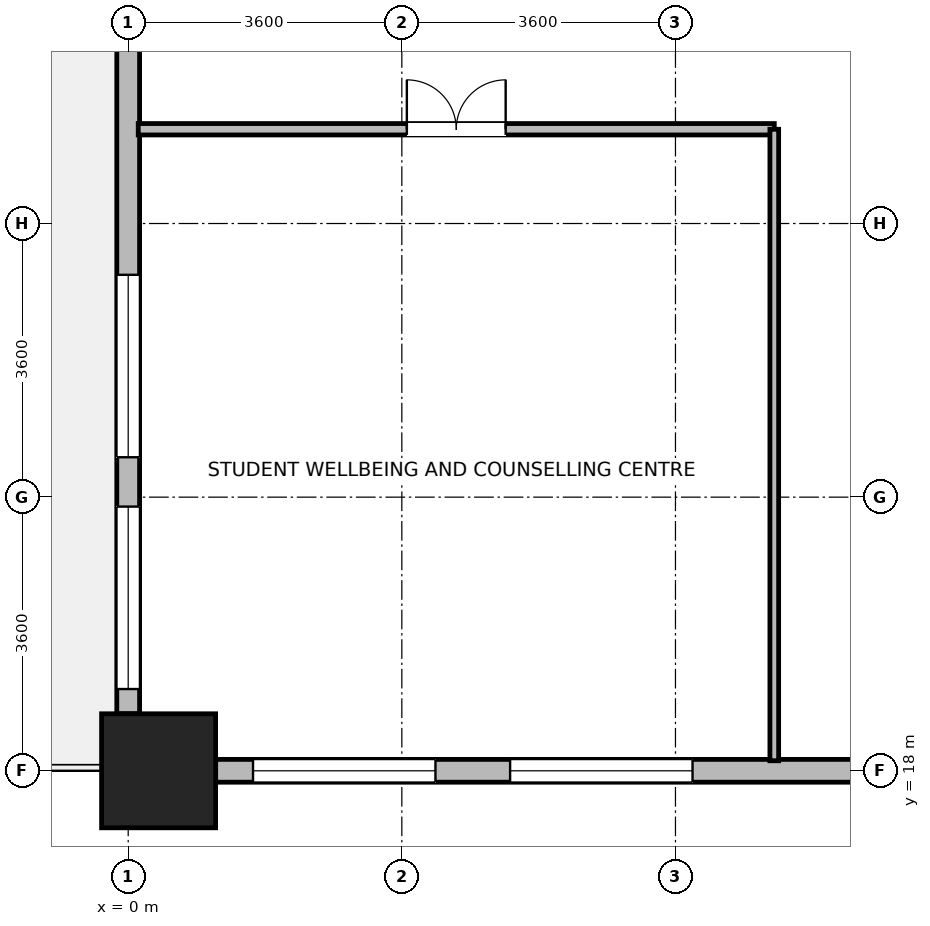
"""IFC4 building model, lengths in metres.
Left out: names, types, materials, properties, quantities, classifications, styles, units other than length and angle.
Written with IfcOpenShell. Run it as: python <this file> out.ifc"""

import sys

from ifc_helpers import new_model, si_unit, direction, frame, frame_2d, origin, origin_2d, place, context, subcontext, project, spatial, rectangle, extrude, source, transform, mapped, element, fill, save


model = new_model("IFC4")
c1 = context("Model", 3, precision=1e-05, world=origin(), true_north=direction((0.0, 1.0)))
c2 = subcontext(c1, "Body", "Model", "MODEL_VIEW")
j1 = project(units=[si_unit("LENGTHUNIT", "METRE"), si_unit("PLANEANGLEUNIT", "RADIAN")], contexts=[c1])
p1 = place(None, origin())
s1 = spatial("IfcSite", under=j1, at=p1, CompositionType="ELEMENT")
p2 = place(p1, origin())
s2 = spatial("IfcBuilding", under=s1, at=p2, CompositionType="ELEMENT")
p3 = place(p2, frame((0.0, 0.0, 15.0)))
s3 = spatial("IfcBuildingStorey", under=s2, at=p3, CompositionType="ELEMENT", Elevation=15.0)
m1 = source(origin(), c2, "Body", "SweptSolid", [
    extrude(rectangle(XDim=1.5, YDim=1.5, at=origin_2d()), origin(), (0.0, 0.0, 1.0), 4.8),
])
p4 = place(p3, frame((0.4, 18.0, 0.0), z_axis=(0.0, 0.0, 1.0), x_axis=(1.0, 0.0, 0.0)))
e1 = element("IfcColumn", 1, at=p4, inside=s3, PredefinedType="COLUMN", context=c2, shape_type="MappedRepresentation", body=[
    mapped(m1, transform((0.0, 0.0, 0.0), x_axis=(1.0, 0.0, 0.0), y_axis=(0.0, 1.0, 0.0), z_axis=(0.0, 0.0, 1.0), scale=1.0)),
])
p5 = place(p3, frame((0.0, 18.751, 0.0), z_axis=(0.0, 0.0, 1.0), x_axis=(0.0, 1.0, 0.0)))
e2 = element("IfcWall", 2, at=p5, inside=s3, PredefinedType="STANDARD", context=c2, shape_type="SweptSolid", body=[
    extrude(rectangle(XDim=9.148, YDim=0.3, at=frame_2d((4.574, 0.0))), origin(), (0.0, 0.0, 1.0), 4.36),
])
p6 = place(p5, frame((0.325, 0.0, 0.9)))
e3 = element("IfcOpeningElement", 3, at=p6, cuts=e2, PredefinedType="OPENING", context=c2, shape_type="SweptSolid", body=[
    extrude(rectangle(XDim=2.4, YDim=2.5, at=frame_2d((1.2, 1.25))), frame((0.0, 0.16, 0.0), z_axis=(0.0, -1.0, 0.0), x_axis=(1.0, 0.0, 0.0)), (0.0, 0.0, 1.0), 0.32),
])
p7 = place(p5, frame((3.374, 0.0, 0.9)))
e4 = element("IfcOpeningElement", 4, at=p7, cuts=e2, PredefinedType="OPENING", context=c2, shape_type="SweptSolid", body=[
    extrude(rectangle(XDim=2.4, YDim=2.5, at=frame_2d((1.2, 1.25))), frame((0.0, 0.16, 0.0), z_axis=(0.0, -1.0, 0.0), x_axis=(1.0, 0.0, 0.0)), (0.0, 0.0, 1.0), 0.32),
])
p8 = place(p3, frame((21.445, 18.0, 0.0), z_axis=(0.0, 0.0, 1.0), x_axis=(-1.0, 0.0, 0.0)))
e5 = element("IfcWall", 5, at=p8, inside=s3, PredefinedType="STANDARD", context=c2, shape_type="SweptSolid", body=[
    extrude(rectangle(XDim=20.294, YDim=0.3, at=frame_2d((10.147, 0.0))), origin(), (0.0, 0.0, 1.0), 4.36),
])
p9 = place(p8, frame((0.491, 0.0, 0.9)))
e6 = element("IfcOpeningElement", 6, at=p9, cuts=e5, PredefinedType="OPENING", context=c2, shape_type="SweptSolid", body=[
    extrude(rectangle(XDim=2.4, YDim=2.5, at=frame_2d((1.2, 1.25))), frame((0.0, 0.16, 0.0), z_axis=(0.0, -1.0, 0.0), x_axis=(1.0, 0.0, 0.0)), (0.0, 0.0, 1.0), 0.32),
])
p10 = place(p8, frame((3.874, 0.0, 0.9)))
e7 = element("IfcOpeningElement", 7, at=p10, cuts=e5, PredefinedType="OPENING", context=c2, shape_type="SweptSolid", body=[
    extrude(rectangle(XDim=2.4, YDim=2.5, at=frame_2d((1.2, 1.25))), frame((0.0, 0.16, 0.0), z_axis=(0.0, -1.0, 0.0), x_axis=(1.0, 0.0, 0.0)), (0.0, 0.0, 1.0), 0.32),
])
p11 = place(p8, frame((7.256, 0.0, 0.9)))
e8 = element("IfcOpeningElement", 8, at=p11, cuts=e5, PredefinedType="OPENING", context=c2, shape_type="SweptSolid", body=[
    extrude(rectangle(XDim=2.4, YDim=2.5, at=frame_2d((1.2, 1.25))), frame((0.0, 0.16, 0.0), z_axis=(0.0, -1.0, 0.0), x_axis=(1.0, 0.0, 0.0)), (0.0, 0.0, 1.0), 0.32),
])
p12 = place(p8, frame((14.021, 0.0, 0.9)))
e9 = element("IfcOpeningElement", 9, at=p12, cuts=e5, PredefinedType="OPENING", context=c2, shape_type="SweptSolid", body=[
    extrude(rectangle(XDim=2.4, YDim=2.5, at=frame_2d((1.2, 1.25))), frame((0.0, 0.16, 0.0), z_axis=(0.0, -1.0, 0.0), x_axis=(1.0, 0.0, 0.0)), (0.0, 0.0, 1.0), 0.32),
])
p13 = place(p8, frame((17.403, 0.0, 0.9)))
e10 = element("IfcOpeningElement", 10, at=p13, cuts=e5, PredefinedType="OPENING", context=c2, shape_type="SweptSolid", body=[
    extrude(rectangle(XDim=2.4, YDim=2.5, at=frame_2d((1.2, 1.25))), frame((0.0, 0.16, 0.0), z_axis=(0.0, -1.0, 0.0), x_axis=(1.0, 0.0, 0.0)), (0.0, 0.0, 1.0), 0.32),
])
p14 = place(p3, frame((0.132, 26.44, 0.0), z_axis=(0.0, 0.0, 1.0), x_axis=(1.0, 0.0, 0.0)))
e11 = element("IfcWall", 11, at=p14, inside=s3, PredefinedType="PARTITIONING", context=c2, shape_type="SweptSolid", body=[
    extrude(rectangle(XDim=8.368, YDim=0.15, at=frame_2d((4.184, 0.0))), origin(), (0.0, 0.0, 1.0), 4.36),
])
p15 = place(p14, frame((3.534, 0.0, 0.0)))
e12 = element("IfcOpeningElement", 12, at=p15, cuts=e11, PredefinedType="OPENING", context=c2, shape_type="SweptSolid", body=[
    extrude(rectangle(XDim=1.3, YDim=2.12, at=frame_2d((0.65, 1.06))), frame((0.0, 0.085, 0.0), z_axis=(0.0, -1.0, 0.0), x_axis=(1.0, 0.0, 0.0)), (0.0, 0.0, 1.0), 0.17),
])
p16 = place(p3, frame((8.5, 18.132, 0.0), z_axis=(0.0, 0.0, 1.0), x_axis=(0.0, 1.0, 0.0)))
e13 = element("IfcWall", 13, at=p16, inside=s3, PredefinedType="PARTITIONING", context=c2, shape_type="SweptSolid", body=[
    extrude(rectangle(XDim=8.308, YDim=0.115, at=frame_2d((4.154, 0.0))), origin(), (0.0, 0.0, 1.0), 4.36),
])
p17 = place(p6, origin())
e14 = element("IfcWindow", 14, at=p17, inside=s3, PartitioningType="SINGLE_PANEL", PredefinedType="WINDOW", context=c2, shape_type="SweptSolid", body=[
    extrude(rectangle(XDim=2.4, YDim=2.5, at=frame_2d((1.2, 1.25))), frame((0.0, 0.03, 0.0), z_axis=(0.0, -1.0, 0.0), x_axis=(1.0, 0.0, 0.0)), (0.0, 0.0, 1.0), 0.06),
])
fill(e3, e14)
p18 = place(p7, origin())
e15 = element("IfcWindow", 15, at=p18, inside=s3, PartitioningType="SINGLE_PANEL", PredefinedType="WINDOW", context=c2, shape_type="SweptSolid", body=[
    extrude(rectangle(XDim=2.4, YDim=2.5, at=frame_2d((1.2, 1.25))), frame((0.0, 0.03, 0.0), z_axis=(0.0, -1.0, 0.0), x_axis=(1.0, 0.0, 0.0)), (0.0, 0.0, 1.0), 0.06),
])
fill(e4, e15)
p19 = place(p12, origin())
e16 = element("IfcWindow", 16, at=p19, inside=s3, PartitioningType="SINGLE_PANEL", PredefinedType="WINDOW", context=c2, shape_type="SweptSolid", body=[
    extrude(rectangle(XDim=2.4, YDim=2.5, at=frame_2d((1.2, 1.25))), frame((0.0, 0.03, 0.0), z_axis=(0.0, -1.0, 0.0), x_axis=(1.0, 0.0, 0.0)), (0.0, 0.0, 1.0), 0.06),
])
fill(e9, e16)
p20 = place(p13, origin())
e17 = element("IfcWindow", 17, at=p20, inside=s3, PartitioningType="SINGLE_PANEL", PredefinedType="WINDOW", context=c2, shape_type="SweptSolid", body=[
    extrude(rectangle(XDim=2.4, YDim=2.5, at=frame_2d((1.2, 1.25))), frame((0.0, 0.03, 0.0), z_axis=(0.0, -1.0, 0.0), x_axis=(1.0, 0.0, 0.0)), (0.0, 0.0, 1.0), 0.06),
])
fill(e10, e17)
p21 = place(p15, origin())
e18 = element("IfcDoor", 18, at=p21, inside=s3, OperationType="DOUBLE_DOOR_SINGLE_SWING", PredefinedType="DOOR", context=c2, shape_type="SweptSolid", body=[
    extrude(rectangle(XDim=1.3, YDim=2.12, at=frame_2d((0.65, 1.06))), frame((0.0, 0.025, 0.0), z_axis=(0.0, -1.0, 0.0), x_axis=(1.0, 0.0, 0.0)), (0.0, 0.0, 1.0), 0.05),
])
fill(e12, e18)
save(model, sys.argv[1])
